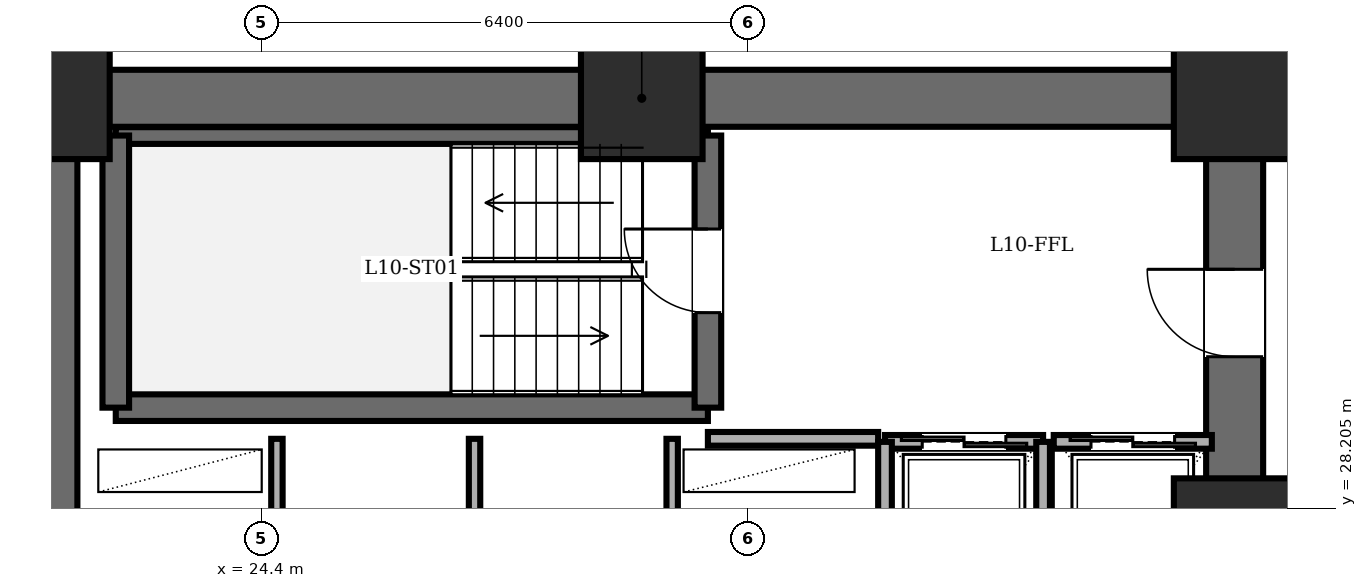
"""IFC4 building model, lengths in metres.
Left out: names, types, materials, properties, quantities, classifications, styles, units other than length and angle.
Written with IfcOpenShell. Run it as: python <this file> out.ifc"""

import sys

from ifc_helpers import new_model, si_unit, direction, frame, frame_2d, origin, origin_2d, place, context, subcontext, project, spatial, rectangle, extrude, element, fill, save


model = new_model("IFC4")
c1 = context("Model", 3, precision=1e-05, world=origin(), true_north=direction((0.0, 1.0)))
c2 = subcontext(c1, "Body", "Model", "MODEL_VIEW")
j1 = project(units=[si_unit("LENGTHUNIT", "METRE"), si_unit("PLANEANGLEUNIT", "RADIAN")], contexts=[c1])
p1 = place(None, origin())
s1 = spatial("IfcSite", under=j1, at=p1, CompositionType="ELEMENT")
p2 = place(p1, origin())
s2 = spatial("IfcBuilding", under=s1, at=p2, CompositionType="ELEMENT")
p3 = place(p2, frame((0.0, 0.0, 39.6)))
s3 = spatial("IfcBuildingStorey", under=s2, at=p3, CompositionType="ELEMENT", Elevation=39.6)
for number, where, z_axis, x_axis in (
    (1, (37.2, 27.8, 0.0), (0.0, 0.0, 1.0), (1.0, 0.0, 0.0)),
    (2, (37.2, 33.6, 0.0), (0.0, 0.0, 1.0), (1.0, 0.0, 0.0)),
    (3, (29.4, 33.6, 0.0), (0.0, 0.0, 1.0), (1.0, 0.0, 0.0)),
    (4, (21.6, 33.6, 0.0), (0.0, 0.0, 1.0), (1.0, 0.0, 0.0)),
):
    element("IfcColumn", number, at=place(p3, frame(where, z_axis=z_axis, x_axis=x_axis)), inside=s3, PredefinedType="COLUMN", context=c2, shape_type="SweptSolid", body=[
        extrude(rectangle(XDim=1.6, YDim=1.6, at=origin_2d()), origin(), (0.0, 0.0, 1.0), 3.6),
    ])
p4 = place(p3, frame((21.6, 14.4, 0.0), z_axis=(0.0, 0.0, 1.0), x_axis=(0.0, 1.0, 0.0)))
e5 = element("IfcWall", 5, at=p4, inside=s3, PredefinedType="SHEAR", context=c2, shape_type="SweptSolid", body=[
    extrude(rectangle(XDim=19.2, YDim=0.75, at=frame_2d((9.6, 0.0))), origin(), (0.0, 0.0, 1.0), 3.4),
])
p5 = place(p3, frame((21.6, 33.6, 0.0), z_axis=(0.0, 0.0, 1.0), x_axis=(1.0, 0.0, 0.0)))
e6 = element("IfcWall", 6, at=p5, inside=s3, PredefinedType="SHEAR", context=c2, shape_type="SweptSolid", body=[
    extrude(rectangle(XDim=15.6, YDim=0.75, at=frame_2d((7.8, 0.0))), origin(), (0.0, 0.0, 1.0), 3.4),
])
p6 = place(p3, frame((37.2, 14.4, 0.0), z_axis=(0.0, 0.0, 1.0), x_axis=(0.0, 1.0, 0.0)))
e7 = element("IfcWall", 7, at=p6, inside=s3, PredefinedType="SHEAR", context=c2, shape_type="SweptSolid", body=[
    extrude(rectangle(XDim=19.2, YDim=0.75, at=frame_2d((9.6, 0.0))), origin(), (0.0, 0.0, 1.0), 3.4),
])
p7 = place(p6, frame((15.8, 0.0, 0.0)))
e8 = element("IfcOpeningElement", 8, at=p7, cuts=e7, PredefinedType="OPENING", context=c2, shape_type="SweptSolid", body=[
    extrude(rectangle(XDim=1.15, YDim=2.15, at=frame_2d((0.575, 1.075))), frame((0.0, 0.385, 0.0), z_axis=(0.0, -1.0, 0.0), x_axis=(1.0, 0.0, 0.0)), (0.0, 0.0, 1.0), 0.77),
])
p8 = place(p6, frame((3.6, 0.0, 0.0)))
e9 = element("IfcOpeningElement", 9, at=p8, cuts=e7, PredefinedType="OPENING", context=c2, shape_type="SweptSolid", body=[
    extrude(rectangle(XDim=1.1, YDim=2.15, at=frame_2d((0.55, 1.075))), frame((0.0, 0.385, 0.0), z_axis=(0.0, -1.0, 0.0), x_axis=(1.0, 0.0, 0.0)), (0.0, 0.0, 1.0), 0.77),
])
p9 = place(p6, frame((8.6, 0.0, 0.0)))
e10 = element("IfcOpeningElement", 10, at=p9, cuts=e7, PredefinedType="OPENING", context=c2, shape_type="SweptSolid", body=[
    extrude(rectangle(XDim=1.3, YDim=2.2, at=frame_2d((0.65, 1.1))), frame((0.0, 0.385, 0.0), z_axis=(0.0, -1.0, 0.0), x_axis=(1.0, 0.0, 0.0)), (0.0, 0.0, 1.0), 0.77),
])
p10 = place(p3, frame((22.48, 29.53, 0.0), z_axis=(0.0, 0.0, 1.0), x_axis=(1.0, 0.0, 0.0)))
e11 = element("IfcWall", 11, at=p10, inside=s3, PredefinedType="SOLIDWALL", context=c2, shape_type="SweptSolid", body=[
    extrude(rectangle(XDim=7.79, YDim=0.35, at=frame_2d((3.895, 0.0))), origin(), (0.0, 0.0, 1.0), 3.4),
])
p11 = place(p3, frame((22.48, 33.11, 0.0), z_axis=(0.0, 0.0, 1.0), x_axis=(1.0, 0.0, 0.0)))
e12 = element("IfcWall", 12, at=p11, inside=s3, PredefinedType="PARTITIONING", context=c2, shape_type="SweptSolid", body=[
    extrude(rectangle(XDim=7.79, YDim=0.22, at=frame_2d((3.895, 0.0))), origin(), (0.0, 0.0, 1.0), 3.4),
])
p12 = place(p3, frame((22.48, 29.53, 0.0), z_axis=(0.0, 0.0, 1.0), x_axis=(0.0, 1.0, 0.0)))
e13 = element("IfcWall", 13, at=p12, inside=s3, PredefinedType="SOLIDWALL", context=c2, shape_type="SweptSolid", body=[
    extrude(rectangle(XDim=3.58, YDim=0.35, at=frame_2d((1.79, 0.0))), origin(), (0.0, 0.0, 1.0), 3.4),
])
p13 = place(p3, frame((30.27, 29.53, 0.0), z_axis=(0.0, 0.0, 1.0), x_axis=(0.0, 1.0, 0.0)))
e14 = element("IfcWall", 14, at=p13, inside=s3, PredefinedType="SOLIDWALL", context=c2, shape_type="SweptSolid", body=[
    extrude(rectangle(XDim=3.58, YDim=0.35, at=frame_2d((1.79, 0.0))), origin(), (0.0, 0.0, 1.0), 3.4),
])
p14 = place(p13, frame((1.25, 0.0, 0.0)))
e15 = element("IfcOpeningElement", 15, at=p14, cuts=e14, PredefinedType="OPENING", context=c2, shape_type="SweptSolid", body=[
    extrude(rectangle(XDim=1.1, YDim=2.15, at=frame_2d((0.55, 1.075))), frame((0.0, 0.185, 0.0), z_axis=(0.0, -1.0, 0.0), x_axis=(1.0, 0.0, 0.0)), (0.0, 0.0, 1.0), 0.37),
])
p15 = place(p3, frame((30.27, 29.12, 0.0), z_axis=(0.0, 0.0, 1.0), x_axis=(1.0, 0.0, 0.0)))
e16 = element("IfcWall", 16, at=p15, inside=s3, PredefinedType="PARTITIONING", context=c2, shape_type="SweptSolid", body=[
    extrude(rectangle(XDim=2.24, YDim=0.18, at=frame_2d((1.12, 0.0))), origin(), (0.0, 0.0, 1.0), 3.4),
])
for number, where, z_axis, x_axis in (
    (17, (24.6, 27.6, 0.0), (0.0, 0.0, 1.0), (0.0, 1.0, 0.0)),
    (18, (27.2, 27.6, 0.0), (0.0, 0.0, 1.0), (0.0, 1.0, 0.0)),
    (19, (29.8, 27.6, 0.0), (0.0, 0.0, 1.0), (0.0, 1.0, 0.0)),
):
    element("IfcWall", number, at=place(p3, frame(where, z_axis=z_axis, x_axis=x_axis)), inside=s3, PredefinedType="PARTITIONING", context=c2, shape_type="SweptSolid", body=[
        extrude(rectangle(XDim=1.52, YDim=0.15, at=frame_2d((0.76, 0.0))), origin(), (0.0, 0.0, 1.0), 3.4),
    ])
p16 = place(p3, frame((32.6, 29.08, 0.0), z_axis=(0.0, 0.0, 1.0), x_axis=(1.0, 0.0, 0.0)))
e20 = element("IfcWall", 20, at=p16, inside=s3, PredefinedType="PARTITIONING", context=c2, shape_type="SweptSolid", body=[
    extrude(rectangle(XDim=2.08, YDim=0.18, at=frame_2d((1.04, 0.0))), origin(), (0.0, 0.0, 1.0), 3.4),
])
p17 = place(p16, frame((0.49, 0.0, 0.0)))
e21 = element("IfcOpeningElement", 21, at=p17, cuts=e20, PredefinedType="OPENING", context=c2, shape_type="SweptSolid", body=[
    extrude(rectangle(XDim=1.1, YDim=2.2, at=frame_2d((0.55, 1.1))), frame((0.0, 0.1, 0.0), z_axis=(0.0, -1.0, 0.0), x_axis=(1.0, 0.0, 0.0)), (0.0, 0.0, 1.0), 0.2),
])
for number, where, z_axis, x_axis in (
    (22, (34.68, 26.35, 0.0), (0.0, 0.0, 1.0), (0.0, 1.0, 0.0)),
    (23, (32.6, 29.08, 0.0), (0.0, 0.0, 1.0), (0.0, -1.0, 0.0)),
):
    element("IfcWall", number, at=place(p3, frame(where, z_axis=z_axis, x_axis=x_axis)), inside=s3, PredefinedType="PARTITIONING", context=c2, shape_type="SweptSolid", body=[
        extrude(rectangle(XDim=2.73, YDim=0.18, at=frame_2d((1.365, 0.0))), origin(), (0.0, 0.0, 1.0), 3.4),
    ])
p18 = place(p3, frame((34.82, 29.08, 0.0), z_axis=(0.0, 0.0, 1.0), x_axis=(1.0, 0.0, 0.0)))
e24 = element("IfcWall", 24, at=p18, inside=s3, PredefinedType="PARTITIONING", context=c2, shape_type="SweptSolid", body=[
    extrude(rectangle(XDim=2.08, YDim=0.18, at=frame_2d((1.04, 0.0))), origin(), (0.0, 0.0, 1.0), 3.4),
])
p19 = place(p18, frame((0.49, 0.0, 0.0)))
e25 = element("IfcOpeningElement", 25, at=p19, cuts=e24, PredefinedType="OPENING", context=c2, shape_type="SweptSolid", body=[
    extrude(rectangle(XDim=1.1, YDim=2.2, at=frame_2d((0.55, 1.1))), frame((0.0, 0.1, 0.0), z_axis=(0.0, -1.0, 0.0), x_axis=(1.0, 0.0, 0.0)), (0.0, 0.0, 1.0), 0.2),
])
p20 = place(p14, origin())
e26 = element("IfcDoor", 26, at=p20, inside=s3, OperationType="SINGLE_SWING_RIGHT", PredefinedType="DOOR", context=c2, shape_type="SweptSolid", body=[
    extrude(rectangle(XDim=1.1, YDim=2.15, at=frame_2d((0.55, 1.075))), frame((0.0, 0.025, 0.0), z_axis=(0.0, -1.0, 0.0), x_axis=(1.0, 0.0, 0.0)), (0.0, 0.0, 1.0), 0.05),
])
fill(e15, e26)
p21 = place(p7, origin())
e27 = element("IfcDoor", 27, at=p21, inside=s3, OperationType="SINGLE_SWING_RIGHT", PredefinedType="DOOR", context=c2, shape_type="SweptSolid", body=[
    extrude(rectangle(XDim=1.15, YDim=2.15, at=frame_2d((0.575, 1.075))), frame((0.0, 0.025, 0.0), z_axis=(0.0, -1.0, 0.0), x_axis=(1.0, 0.0, 0.0)), (0.0, 0.0, 1.0), 0.05),
])
fill(e8, e27)
p22 = place(p17, origin())
e28 = element("IfcDoor", 28, at=p22, inside=s3, OperationType="DOUBLE_DOOR_SLIDING", PredefinedType="DOOR", context=c2, shape_type="SweptSolid", body=[
    extrude(rectangle(XDim=1.1, YDim=2.2, at=frame_2d((0.55, 1.1))), frame((0.0, 0.025, 0.0), z_axis=(0.0, -1.0, 0.0), x_axis=(1.0, 0.0, 0.0)), (0.0, 0.0, 1.0), 0.05),
])
fill(e21, e28)
p23 = place(p19, origin())
e29 = element("IfcDoor", 29, at=p23, inside=s3, OperationType="DOUBLE_DOOR_SLIDING", PredefinedType="DOOR", context=c2, shape_type="SweptSolid", body=[
    extrude(rectangle(XDim=1.1, YDim=2.2, at=frame_2d((0.55, 1.1))), frame((0.0, 0.025, 0.0), z_axis=(0.0, -1.0, 0.0), x_axis=(1.0, 0.0, 0.0)), (0.0, 0.0, 1.0), 0.05),
])
fill(e25, e29)
save(model, sys.argv[1])
